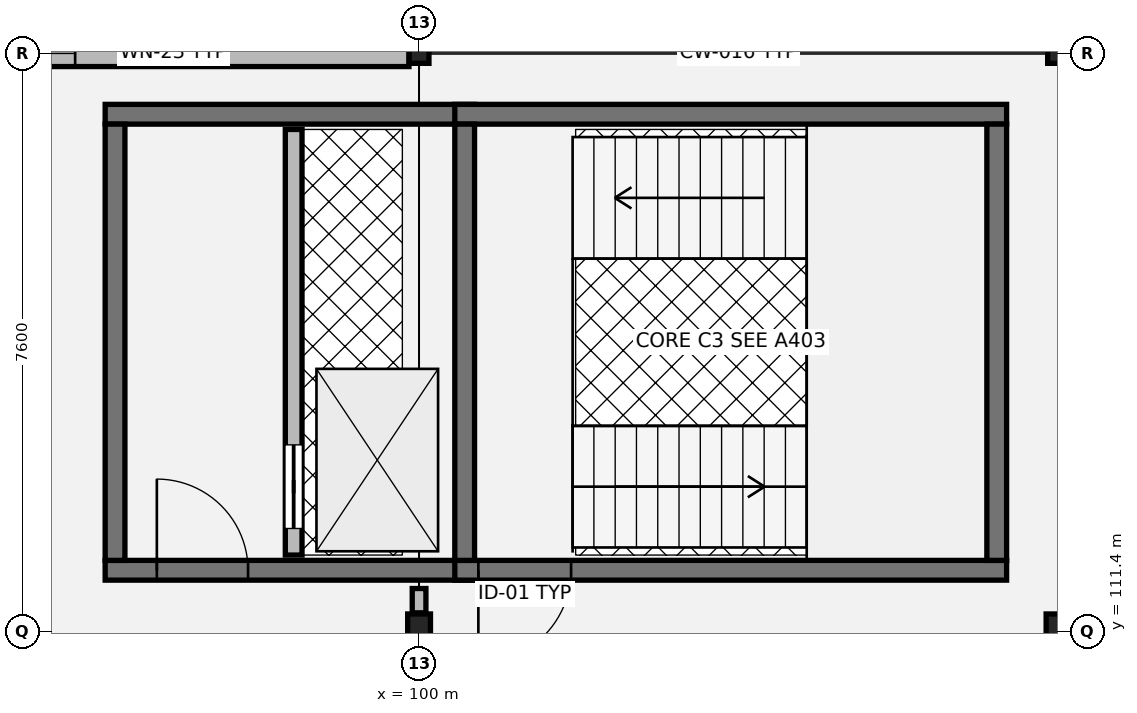
"""IFC4 building model, lengths in metres.
Left out: names, types, materials, properties, quantities, classifications, styles, units other than length and angle.
Written with IfcOpenShell. Run it as: python <this file> out.ifc"""

import sys

from ifc_helpers import new_model, si_unit, direction, frame, frame_2d, origin, origin_2d, place, context, subcontext, project, spatial, rectangle, hollow_rectangle, i_section, extrude, element, fill, save


model = new_model("IFC4")
c1 = context("Model", 3, precision=1e-05, world=origin(), true_north=direction((0.0, 1.0)))
c2 = subcontext(c1, "Body", "Model", "MODEL_VIEW")
j1 = project(units=[si_unit("LENGTHUNIT", "METRE"), si_unit("PLANEANGLEUNIT", "RADIAN")], contexts=[c1])
p1 = place(None, origin())
s1 = spatial("IfcSite", under=j1, at=p1, CompositionType="ELEMENT")
p2 = place(p1, origin())
s2 = spatial("IfcBuilding", under=s1, at=p2, CompositionType="ELEMENT")
p3 = place(p2, frame((0.0, 0.0, 9.18)))
s3 = spatial("IfcBuildingStorey", under=s2, at=p3, CompositionType="ELEMENT", Elevation=9.18)
p4 = place(p3, frame((100.0, 111.4, 0.0), z_axis=(0.0, 0.0, 1.0), x_axis=(1.0, 0.0, 0.0)))
e1 = element("IfcColumn", 1, at=p4, inside=s3, PredefinedType="COLUMN", context=c2, shape_type="SweptSolid", body=[
    extrude(i_section(OverallWidth=0.3, OverallDepth=0.45, WebThickness=0.014, FlangeThickness=0.026, at=origin_2d()), origin(), (0.0, 0.0, 1.0), 4.055),
])
p5 = place(p3, frame((100.0, 119.0, 0.0), z_axis=(0.0, 0.0, 1.0), x_axis=(1.0, 0.0, 0.0)))
e2 = element("IfcColumn", 2, at=p5, inside=s3, PredefinedType="COLUMN", context=c2, shape_type="SweptSolid", body=[
    extrude(hollow_rectangle(XDim=0.26, YDim=0.26, WallThickness=0.012, at=origin_2d()), origin(), (0.0, 0.0, 1.0), 4.055),
])
p6 = place(p3, frame((108.4, 111.4, 0.0), z_axis=(0.0, 0.0, 1.0), x_axis=(1.0, 0.0, 0.0)))
e3 = element("IfcColumn", 3, at=p6, inside=s3, PredefinedType="COLUMN", context=c2, shape_type="SweptSolid", body=[
    extrude(i_section(OverallWidth=0.3, OverallDepth=0.45, WebThickness=0.014, FlangeThickness=0.026, at=origin_2d()), origin(), (0.0, 0.0, 1.0), 4.055),
])
p7 = place(p3, frame((108.4, 119.0, 0.0), z_axis=(0.0, 0.0, 1.0), x_axis=(1.0, 0.0, 0.0)))
e4 = element("IfcColumn", 4, at=p7, inside=s3, PredefinedType="COLUMN", context=c2, shape_type="SweptSolid", body=[
    extrude(hollow_rectangle(XDim=0.26, YDim=0.26, WallThickness=0.012, at=origin_2d()), origin(), (0.0, 0.0, 1.0), 4.055),
])
p8 = place(p3, frame((99.867, 119.0, 0.0), z_axis=(0.0, 0.0, 1.0), x_axis=(-1.0, 0.0, 0.0)))
e5 = element("IfcWall", 5, at=p8, inside=s3, PredefinedType="SOLIDWALL", context=c2, shape_type="SweptSolid", body=[
    extrude(rectangle(XDim=8.134, YDim=0.345, at=frame_2d((4.067, 0.0))), origin(), (0.0, 0.0, 1.0), 3.48),
])
p9 = place(p8, frame((2.462, 0.0, 0.8)))
e6 = element("IfcOpeningElement", 6, at=p9, cuts=e5, PredefinedType="OPENING", context=c2, shape_type="SweptSolid", body=[
    extrude(rectangle(XDim=1.28, YDim=2.08, at=frame_2d((0.64, 1.04))), frame((0.0, 0.182, 0.0), z_axis=(0.0, -1.0, 0.0), x_axis=(1.0, 0.0, 0.0)), (0.0, 0.0, 1.0), 0.365),
])
p10 = place(p8, frame((4.392, 0.0, 0.8)))
e7 = element("IfcOpeningElement", 7, at=p10, cuts=e5, PredefinedType="OPENING", context=c2, shape_type="SweptSolid", body=[
    extrude(rectangle(XDim=1.28, YDim=2.08, at=frame_2d((0.64, 1.04))), frame((0.0, 0.182, 0.0), z_axis=(0.0, -1.0, 0.0), x_axis=(1.0, 0.0, 0.0)), (0.0, 0.0, 1.0), 0.365),
])
p11 = place(p3, frame((95.87, 112.2, 0.0), z_axis=(0.0, 0.0, 1.0), x_axis=(1.0, 0.0, 0.0)))
e8 = element("IfcWall", 8, at=p11, inside=s3, PredefinedType="SHEAR", context=c2, shape_type="SweptSolid", body=[
    extrude(rectangle(XDim=4.86, YDim=0.26, at=frame_2d((2.43, 0.0))), origin(), (0.0, 0.0, 1.0), 3.845),
])
p12 = place(p11, frame((0.68, 0.0, 0.0)))
e9 = element("IfcOpeningElement", 9, at=p12, cuts=e8, PredefinedType="OPENING", context=c2, shape_type="SweptSolid", body=[
    extrude(rectangle(XDim=1.2, YDim=2.16, at=frame_2d((0.6, 1.08))), frame((0.0, 0.14, 0.0), z_axis=(0.0, -1.0, 0.0), x_axis=(1.0, 0.0, 0.0)), (0.0, 0.0, 1.0), 0.28),
])
p13 = place(p3, frame((100.73, 118.2, 0.0), z_axis=(0.0, 0.0, 1.0), x_axis=(-1.0, 0.0, 0.0)))
e10 = element("IfcWall", 10, at=p13, inside=s3, PredefinedType="SHEAR", context=c2, shape_type="SweptSolid", body=[
    extrude(rectangle(XDim=4.86, YDim=0.26, at=frame_2d((2.43, 0.0))), origin(), (0.0, 0.0, 1.0), 3.845),
])
p14 = place(p3, frame((96.0, 118.07, 0.0), z_axis=(0.0, 0.0, 1.0), x_axis=(0.0, -1.0, 0.0)))
e11 = element("IfcWall", 11, at=p14, inside=s3, PredefinedType="SHEAR", context=c2, shape_type="SweptSolid", body=[
    extrude(rectangle(XDim=5.74, YDim=0.26, at=frame_2d((2.87, 0.0))), origin(), (0.0, 0.0, 1.0), 3.845),
])
p15 = place(p3, frame((98.35, 112.4, 0.0), z_axis=(0.0, 0.0, 1.0), x_axis=(0.0, 1.0, 0.0)))
e12 = element("IfcWall", 12, at=p15, inside=s3, PredefinedType="SOLIDWALL", context=c2, shape_type="SweptSolid", body=[
    extrude(rectangle(XDim=5.6, YDim=0.22, at=frame_2d((2.8, 0.0))), origin(), (0.0, 0.0, 1.0), 3.845),
])
p16 = place(p15, frame((0.35, 0.0, 0.0)))
e13 = element("IfcOpeningElement", 13, at=p16, cuts=e12, PredefinedType="OPENING", context=c2, shape_type="SweptSolid", body=[
    extrude(rectangle(XDim=1.1, YDim=2.15, at=frame_2d((0.55, 1.075))), frame((0.0, 0.12, 0.0), z_axis=(0.0, -1.0, 0.0), x_axis=(1.0, 0.0, 0.0)), (0.0, 0.0, 1.0), 0.24),
])
p17 = place(p3, frame((100.47, 112.2, 0.0), z_axis=(0.0, 0.0, 1.0), x_axis=(1.0, 0.0, 0.0)))
e14 = element("IfcWall", 14, at=p17, inside=s3, PredefinedType="SHEAR", context=c2, shape_type="SweptSolid", body=[
    extrude(rectangle(XDim=7.26, YDim=0.26, at=frame_2d((3.63, 0.0))), origin(), (0.0, 0.0, 1.0), 3.845),
])
p18 = place(p17, frame((0.31, 0.0, 0.0)))
e15 = element("IfcOpeningElement", 15, at=p18, cuts=e14, PredefinedType="OPENING", context=c2, shape_type="SweptSolid", body=[
    extrude(rectangle(XDim=1.22, YDim=2.18, at=frame_2d((0.61, 1.09))), frame((0.0, 0.14, 0.0), z_axis=(0.0, -1.0, 0.0), x_axis=(1.0, 0.0, 0.0)), (0.0, 0.0, 1.0), 0.28),
])
p19 = place(p3, frame((100.47, 118.2, 0.0), z_axis=(0.0, 0.0, 1.0), x_axis=(1.0, 0.0, 0.0)))
e16 = element("IfcWall", 16, at=p19, inside=s3, PredefinedType="SHEAR", context=c2, shape_type="SweptSolid", body=[
    extrude(rectangle(XDim=7.26, YDim=0.26, at=frame_2d((3.63, 0.0))), origin(), (0.0, 0.0, 1.0), 3.845),
])
for number, where, z_axis, x_axis in (
    (17, (100.6, 112.33, 0.0), (0.0, 0.0, 1.0), (0.0, 1.0, 0.0)),
    (18, (107.6, 112.33, 0.0), (0.0, 0.0, 1.0), (0.0, 1.0, 0.0)),
):
    element("IfcWall", number, at=place(p3, frame(where, z_axis=z_axis, x_axis=x_axis)), inside=s3, PredefinedType="SHEAR", context=c2, shape_type="SweptSolid", body=[
        extrude(rectangle(XDim=5.74, YDim=0.26, at=frame_2d((2.87, 0.0))), origin(), (0.0, 0.0, 1.0), 3.845),
    ])
p20 = place(p3, frame((100.0, 111.64, 0.0), z_axis=(0.0, 0.0, 1.0), x_axis=(0.0, 1.0, 0.0)))
e19 = element("IfcWall", 19, at=p20, inside=s3, PredefinedType="PARTITIONING", context=c2, shape_type="SweptSolid", body=[
    extrude(rectangle(XDim=0.32, YDim=0.18, at=frame_2d((0.16, 0.0))), origin(), (0.0, 0.0, 1.0), 3.18),
])
p21 = place(p9, origin())
e20 = element("IfcWindow", 20, at=p21, inside=s3, PartitioningType="SINGLE_PANEL", PredefinedType="WINDOW", context=c2, shape_type="SweptSolid", body=[
    extrude(rectangle(XDim=1.28, YDim=2.08, at=frame_2d((0.64, 1.04))), frame((0.0, 0.03, 0.0), z_axis=(0.0, -1.0, 0.0), x_axis=(1.0, 0.0, 0.0)), (0.0, 0.0, 1.0), 0.06),
])
fill(e6, e20)
p22 = place(p10, origin())
e21 = element("IfcWindow", 21, at=p22, inside=s3, PartitioningType="SINGLE_PANEL", PredefinedType="WINDOW", context=c2, shape_type="SweptSolid", body=[
    extrude(rectangle(XDim=1.28, YDim=2.08, at=frame_2d((0.64, 1.04))), frame((0.0, 0.03, 0.0), z_axis=(0.0, -1.0, 0.0), x_axis=(1.0, 0.0, 0.0)), (0.0, 0.0, 1.0), 0.06),
])
fill(e7, e21)
p23 = place(p12, origin())
e22 = element("IfcDoor", 22, at=p23, inside=s3, OperationType="SINGLE_SWING_LEFT", PredefinedType="DOOR", context=c2, shape_type="SweptSolid", body=[
    extrude(rectangle(XDim=1.2, YDim=2.16, at=frame_2d((0.6, 1.08))), frame((0.0, 0.025, 0.0), z_axis=(0.0, -1.0, 0.0), x_axis=(1.0, 0.0, 0.0)), (0.0, 0.0, 1.0), 0.05),
])
fill(e9, e22)
p24 = place(p16, origin())
e23 = element("IfcDoor", 23, at=p24, inside=s3, OperationType="SLIDING_TO_LEFT", PredefinedType="DOOR", context=c2, shape_type="SweptSolid", body=[
    extrude(rectangle(XDim=1.1, YDim=2.15, at=frame_2d((0.55, 1.075))), frame((0.0, 0.025, 0.0), z_axis=(0.0, -1.0, 0.0), x_axis=(1.0, 0.0, 0.0)), (0.0, 0.0, 1.0), 0.05),
])
fill(e13, e23)
p25 = place(p18, origin())
e24 = element("IfcDoor", 24, at=p25, inside=s3, OperationType="SINGLE_SWING_RIGHT", PredefinedType="DOOR", context=c2, shape_type="SweptSolid", body=[
    extrude(rectangle(XDim=1.22, YDim=2.18, at=frame_2d((0.61, 1.09))), frame((0.0, 0.025, 0.0), z_axis=(0.0, -1.0, 0.0), x_axis=(1.0, 0.0, 0.0)), (0.0, 0.0, 1.0), 0.05),
])
fill(e15, e24)
save(model, sys.argv[1])
